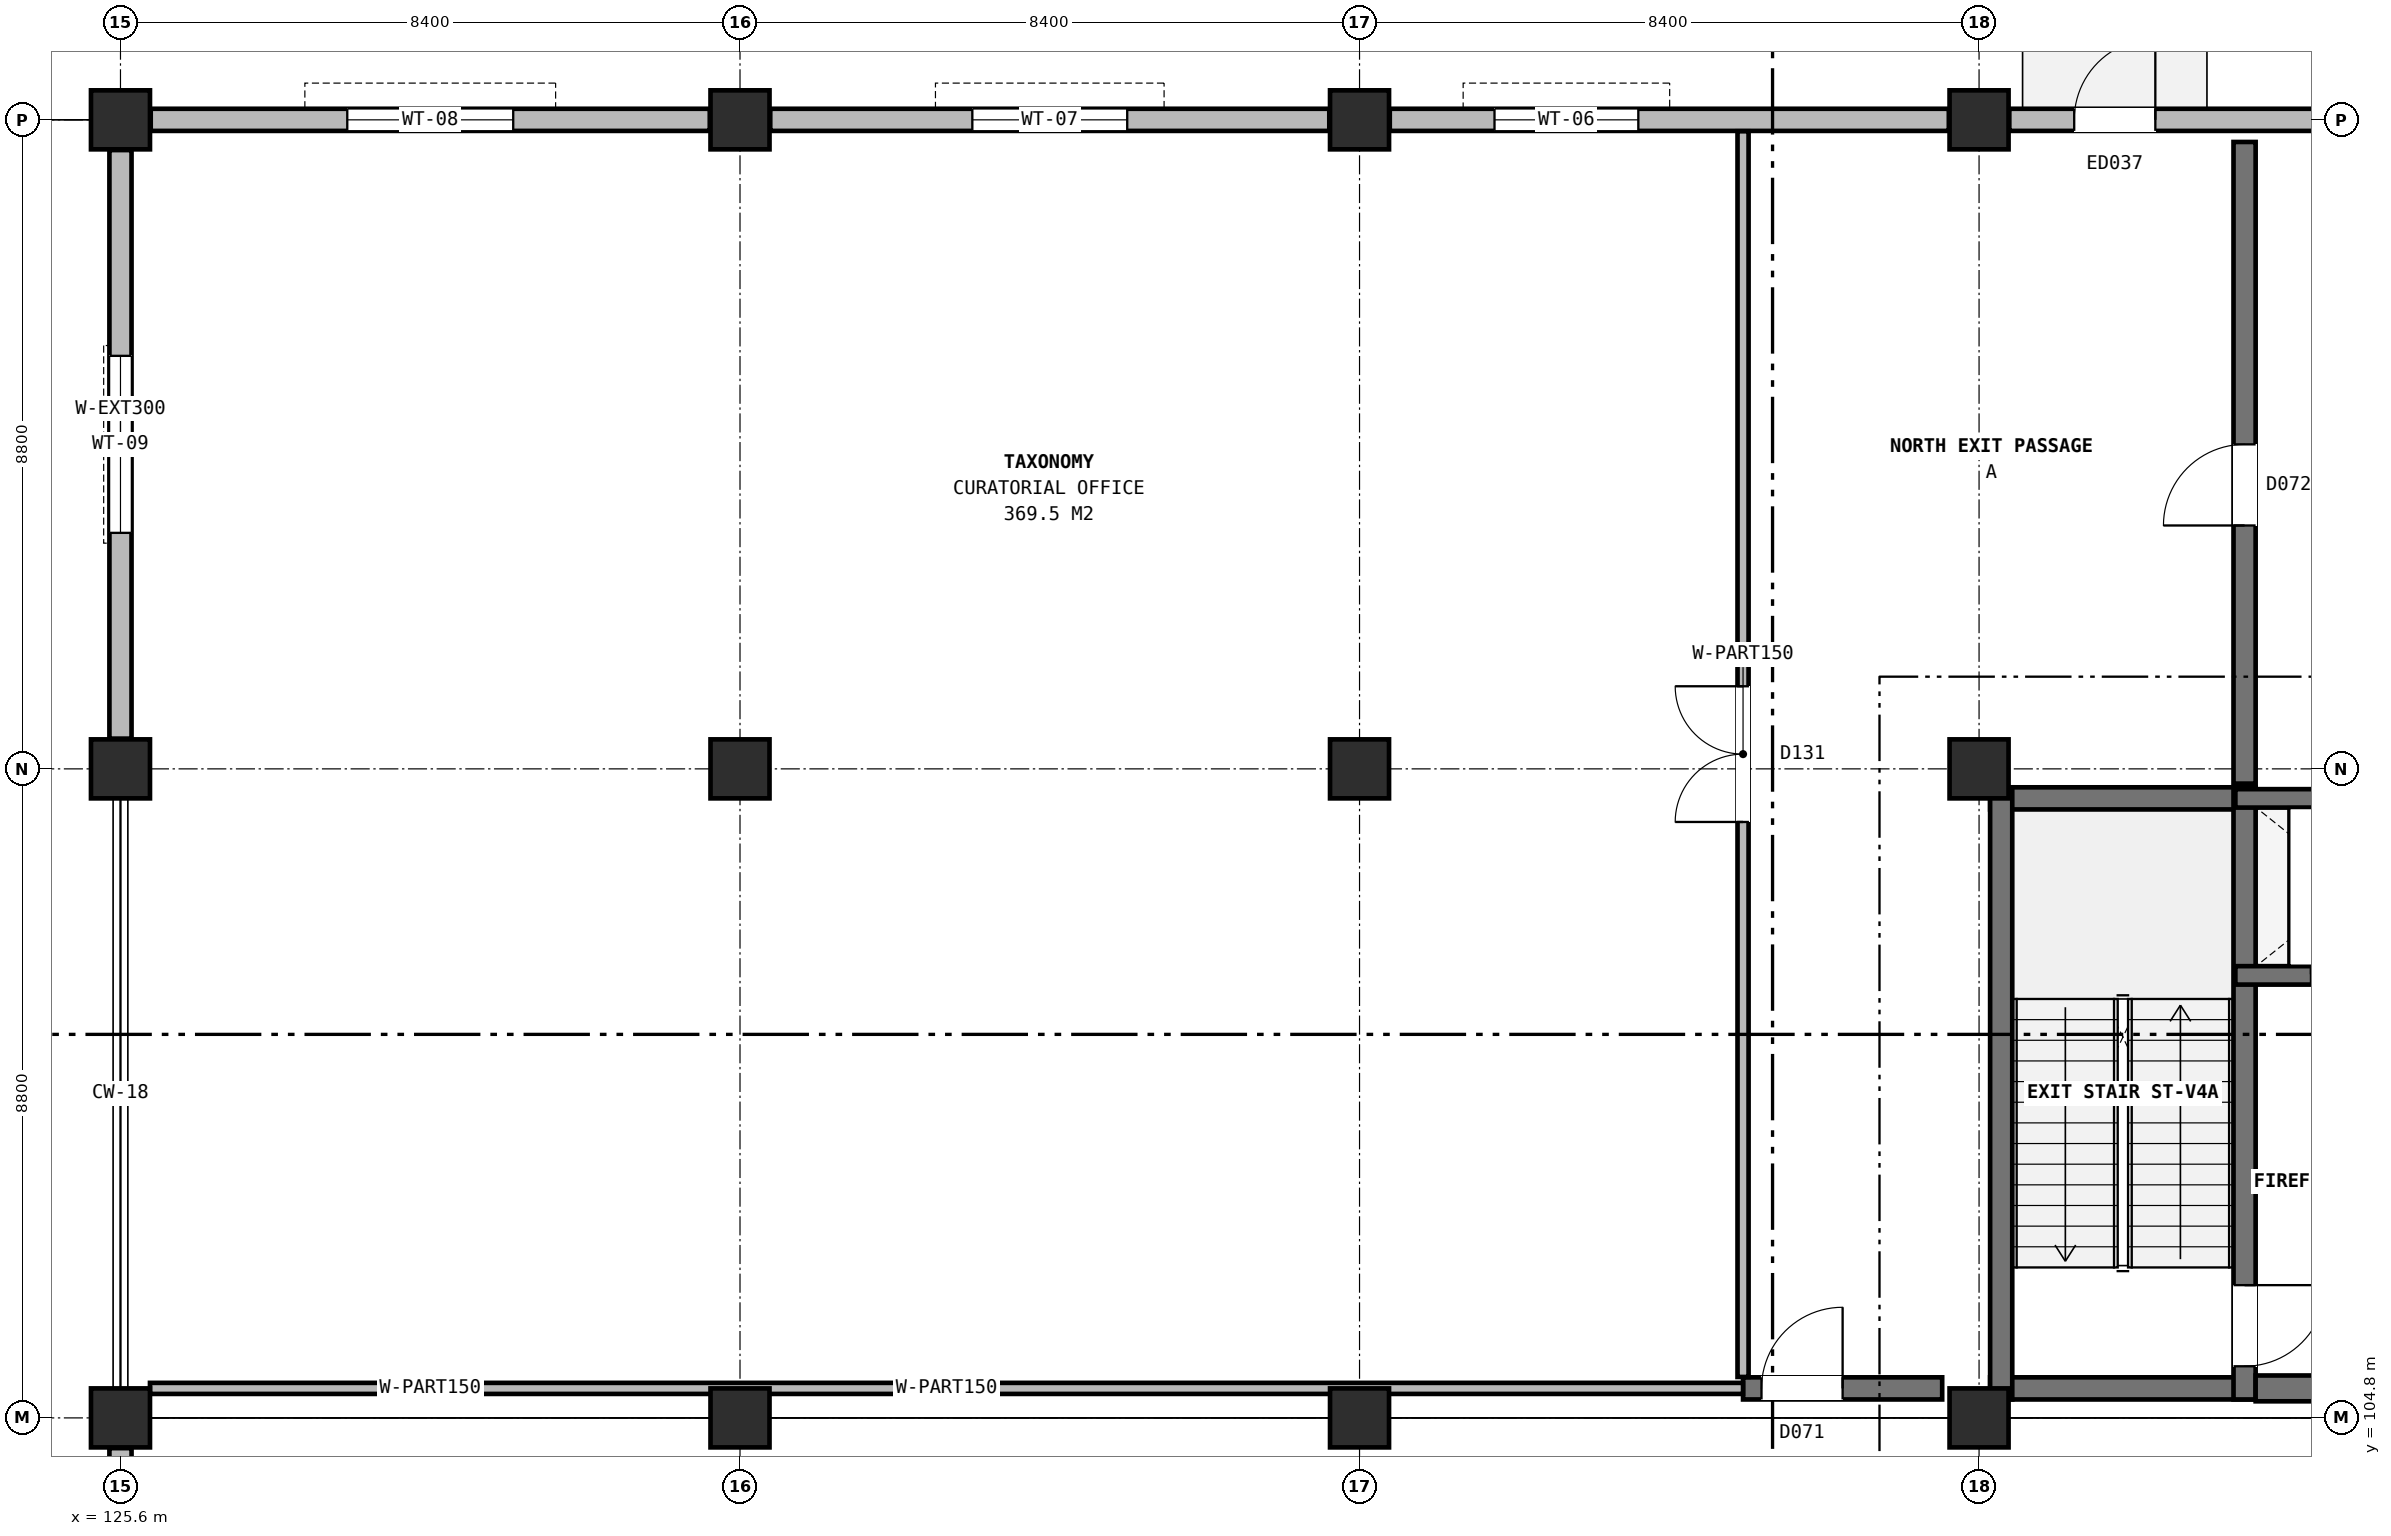
"""IFC4 building model, lengths in metres.
Left out: names, types, materials, properties, quantities, classifications, styles, units other than length and angle.
Written with IfcOpenShell. Run it as: python <this file> out.ifc"""

import sys

from ifc_helpers import new_model, si_unit, direction, frame, frame_2d, origin, origin_2d, place, context, subcontext, project, spatial, rectangle, extrude, element, fill, save


model = new_model("IFC4")
c1 = context("Model", 3, precision=1e-05, world=origin(), true_north=direction((0.0, 1.0)))
c2 = subcontext(c1, "Body", "Model", "MODEL_VIEW")
j1 = project(units=[si_unit("LENGTHUNIT", "METRE"), si_unit("PLANEANGLEUNIT", "RADIAN")], contexts=[c1])
p1 = place(None, origin())
s1 = spatial("IfcSite", under=j1, at=p1, CompositionType="ELEMENT")
p2 = place(p1, origin())
s2 = spatial("IfcBuilding", under=s1, at=p2, CompositionType="ELEMENT")
p3 = place(p2, origin())
s3 = spatial("IfcBuildingStorey", under=s2, at=p3, CompositionType="ELEMENT", Elevation=0.0)
for number, where, z_axis, x_axis in (
    (1, (125.6, 104.8, 0.0), (0.0, 0.0, 1.0), (1.0, 0.0, 0.0)),
    (2, (125.6, 113.6, 0.0), (0.0, 0.0, 1.0), (1.0, 0.0, 0.0)),
    (3, (125.6, 122.4, 0.0), (0.0, 0.0, 1.0), (1.0, 0.0, 0.0)),
    (4, (134.0, 104.8, 0.0), (0.0, 0.0, 1.0), (1.0, 0.0, 0.0)),
    (5, (134.0, 113.6, 0.0), (0.0, 0.0, 1.0), (1.0, 0.0, 0.0)),
    (6, (134.0, 122.4, 0.0), (0.0, 0.0, 1.0), (1.0, 0.0, 0.0)),
    (7, (142.4, 104.8, 0.0), (0.0, 0.0, 1.0), (1.0, 0.0, 0.0)),
    (8, (142.4, 113.6, 0.0), (0.0, 0.0, 1.0), (1.0, 0.0, 0.0)),
    (9, (142.4, 122.4, 0.0), (0.0, 0.0, 1.0), (1.0, 0.0, 0.0)),
    (10, (150.8, 104.8, 0.0), (0.0, 0.0, 1.0), (1.0, 0.0, 0.0)),
    (11, (150.8, 113.6, 0.0), (0.0, 0.0, 1.0), (1.0, 0.0, 0.0)),
    (12, (150.8, 122.4, 0.0), (0.0, 0.0, 1.0), (1.0, 0.0, 0.0)),
):
    element("IfcColumn", number, at=place(p3, frame(where, z_axis=z_axis, x_axis=x_axis)), inside=s3, PredefinedType="COLUMN", context=c2, shape_type="SweptSolid", body=[
        extrude(rectangle(XDim=0.8, YDim=0.8, at=origin_2d()), origin(), (0.0, 0.0, 1.0), 4.8),
    ])
p4 = place(p3, frame((158.79, 122.4, 0.0), z_axis=(0.0, 0.0, 1.0), x_axis=(-1.0, 0.0, 0.0)))
e13 = element("IfcWall", 13, at=p4, inside=s3, PredefinedType="SOLIDWALL", context=c2, shape_type="SweptSolid", body=[
    extrude(rectangle(XDim=7.58, YDim=0.3, at=frame_2d((3.79, 0.0))), origin(), (0.0, 0.0, 1.0), 4.05),
])
p5 = place(p4, frame((5.6, 0.0, 0.0)))
e14 = element("IfcOpeningElement", 14, at=p5, cuts=e13, PredefinedType="OPENING", context=c2, shape_type="SweptSolid", body=[
    extrude(rectangle(XDim=1.1, YDim=2.2, at=frame_2d((0.55, 1.1))), frame((0.0, 0.16, 0.0), z_axis=(0.0, -1.0, 0.0), x_axis=(1.0, 0.0, 0.0)), (0.0, 0.0, 1.0), 0.32),
])
p6 = place(p3, frame((150.39, 122.4, 0.0), z_axis=(0.0, 0.0, 1.0), x_axis=(-1.0, 0.0, 0.0)))
e15 = element("IfcWall", 15, at=p6, inside=s3, PredefinedType="SOLIDWALL", context=c2, shape_type="SweptSolid", body=[
    extrude(rectangle(XDim=7.58, YDim=0.3, at=frame_2d((3.79, 0.0))), origin(), (0.0, 0.0, 1.0), 4.05),
])
p7 = place(p6, frame((4.21, 0.0, 0.9)))
e16 = element("IfcOpeningElement", 16, at=p7, cuts=e15, PredefinedType="OPENING", context=c2, shape_type="SweptSolid", body=[
    extrude(rectangle(XDim=1.95, YDim=1.9, at=frame_2d((0.975, 0.95))), frame((0.0, 0.16, 0.0), z_axis=(0.0, -1.0, 0.0), x_axis=(1.0, 0.0, 0.0)), (0.0, 0.0, 1.0), 0.32),
])
p8 = place(p3, frame((141.99, 122.4, 0.0), z_axis=(0.0, 0.0, 1.0), x_axis=(-1.0, 0.0, 0.0)))
e17 = element("IfcWall", 17, at=p8, inside=s3, PredefinedType="SOLIDWALL", context=c2, shape_type="SweptSolid", body=[
    extrude(rectangle(XDim=7.58, YDim=0.3, at=frame_2d((3.79, 0.0))), origin(), (0.0, 0.0, 1.0), 4.05),
])
p9 = place(p8, frame((2.74, 0.0, 0.9)))
e18 = element("IfcOpeningElement", 18, at=p9, cuts=e17, PredefinedType="OPENING", context=c2, shape_type="SweptSolid", body=[
    extrude(rectangle(XDim=2.1, YDim=1.95, at=frame_2d((1.05, 0.975))), frame((0.0, 0.16, 0.0), z_axis=(0.0, -1.0, 0.0), x_axis=(1.0, 0.0, 0.0)), (0.0, 0.0, 1.0), 0.32),
])
p10 = place(p3, frame((133.59, 122.4, 0.0), z_axis=(0.0, 0.0, 1.0), x_axis=(-1.0, 0.0, 0.0)))
e19 = element("IfcWall", 19, at=p10, inside=s3, PredefinedType="SOLIDWALL", context=c2, shape_type="SweptSolid", body=[
    extrude(rectangle(XDim=7.58, YDim=0.3, at=frame_2d((3.79, 0.0))), origin(), (0.0, 0.0, 1.0), 4.05),
])
p11 = place(p10, frame((2.665, 0.0, 0.9)))
e20 = element("IfcOpeningElement", 20, at=p11, cuts=e19, PredefinedType="OPENING", context=c2, shape_type="SweptSolid", body=[
    extrude(rectangle(XDim=2.25, YDim=1.95, at=frame_2d((1.125, 0.975))), frame((0.0, 0.16, 0.0), z_axis=(0.0, -1.0, 0.0), x_axis=(1.0, 0.0, 0.0)), (0.0, 0.0, 1.0), 0.32),
])
p12 = place(p3, frame((125.6, 121.99, 0.0), z_axis=(0.0, 0.0, 1.0), x_axis=(0.0, -1.0, 0.0)))
e21 = element("IfcWall", 21, at=p12, inside=s3, PredefinedType="SOLIDWALL", context=c2, shape_type="SweptSolid", body=[
    extrude(rectangle(XDim=7.98, YDim=0.3, at=frame_2d((3.99, 0.0))), origin(), (0.0, 0.0, 1.0), 4.05),
])
p13 = place(p12, frame((2.79, 0.0, 0.9)))
e22 = element("IfcOpeningElement", 22, at=p13, cuts=e21, PredefinedType="OPENING", context=c2, shape_type="SweptSolid", body=[
    extrude(rectangle(XDim=2.4, YDim=2.0, at=frame_2d((1.2, 1.0))), frame((0.0, 0.16, 0.0), z_axis=(0.0, -1.0, 0.0), x_axis=(1.0, 0.0, 0.0)), (0.0, 0.0, 1.0), 0.32),
])
p14 = place(p3, frame((125.6, 104.39, 0.0), z_axis=(0.0, 0.0, 1.0), x_axis=(0.0, -1.0, 0.0)))
e23 = element("IfcWall", 23, at=p14, inside=s3, PredefinedType="SOLIDWALL", context=c2, shape_type="SweptSolid", body=[
    extrude(rectangle(XDim=2.38, YDim=0.3, at=frame_2d((1.19, 0.0))), origin(), (0.0, 0.0, 1.0), 4.05),
])
for number, where, z_axis, x_axis in (
    (24, (150.95, 105.2, 0.0), (0.0, 0.0, 1.0), (1.0, 0.0, 0.0)),
    (25, (150.95, 113.2, 0.0), (0.0, 0.0, 1.0), (1.0, 0.0, 0.0)),
):
    element("IfcWall", number, at=place(p3, frame(where, z_axis=z_axis, x_axis=x_axis)), inside=s3, PredefinedType="SHEAR", context=c2, shape_type="SweptSolid", body=[
        extrude(rectangle(XDim=3.6, YDim=0.3, at=frame_2d((1.8, 0.0))), origin(), (0.0, 0.0, 1.0), 4.8),
    ])
p15 = place(p3, frame((151.1, 105.05, 0.0), z_axis=(0.0, 0.0, 1.0), x_axis=(0.0, 1.0, 0.0)))
e26 = element("IfcWall", 26, at=p15, inside=s3, PredefinedType="SHEAR", context=c2, shape_type="SweptSolid", body=[
    extrude(rectangle(XDim=8.3, YDim=0.3, at=frame_2d((4.15, 0.0))), origin(), (0.0, 0.0, 1.0), 4.8),
])
p16 = place(p3, frame((154.4, 105.05, 0.0), z_axis=(0.0, 0.0, 1.0), x_axis=(0.0, 1.0, 0.0)))
e27 = element("IfcWall", 27, at=p16, inside=s3, PredefinedType="SHEAR", context=c2, shape_type="SweptSolid", body=[
    extrude(rectangle(XDim=8.3, YDim=0.3, at=frame_2d((4.15, 0.0))), origin(), (0.0, 0.0, 1.0), 4.8),
])
p17 = place(p16, frame((0.45, 0.0, 0.0)))
e28 = element("IfcOpeningElement", 28, at=p17, cuts=e27, PredefinedType="OPENING", context=c2, shape_type="SweptSolid", body=[
    extrude(rectangle(XDim=1.1, YDim=2.2, at=frame_2d((0.55, 1.1))), frame((0.0, 0.16, 0.0), z_axis=(0.0, -1.0, 0.0), x_axis=(1.0, 0.0, 0.0)), (0.0, 0.0, 1.0), 0.32),
])
p18 = place(p3, frame((154.275, 110.8, 0.0), z_axis=(0.0, 0.0, 1.0), x_axis=(1.0, 0.0, 0.0)))
e29 = element("IfcWall", 29, at=p18, inside=s3, PredefinedType="SOLIDWALL", context=c2, shape_type="SweptSolid", body=[
    extrude(rectangle(XDim=3.25, YDim=0.25, at=frame_2d((1.625, 0.0))), origin(), (0.0, 0.0, 1.0), 4.48),
])
p19 = place(p18, frame((1.025, 0.0, 0.0)))
e30 = element("IfcOpeningElement", 30, at=p19, cuts=e29, PredefinedType="OPENING", context=c2, shape_type="SweptSolid", body=[
    extrude(rectangle(XDim=1.2, YDim=2.2, at=frame_2d((0.6, 1.1))), frame((0.0, 0.135, 0.0), z_axis=(0.0, -1.0, 0.0), x_axis=(1.0, 0.0, 0.0)), (0.0, 0.0, 1.0), 0.27),
])
p20 = place(p3, frame((154.275, 113.2, 0.0), z_axis=(0.0, 0.0, 1.0), x_axis=(1.0, 0.0, 0.0)))
e31 = element("IfcWall", 31, at=p20, inside=s3, PredefinedType="SOLIDWALL", context=c2, shape_type="SweptSolid", body=[
    extrude(rectangle(XDim=3.25, YDim=0.25, at=frame_2d((1.625, 0.0))), origin(), (0.0, 0.0, 1.0), 4.48),
])
p21 = place(p3, frame((154.55, 105.2, 0.0), z_axis=(0.0, 0.0, 1.0), x_axis=(1.0, 0.0, 0.0)))
e32 = element("IfcWall", 32, at=p21, inside=s3, PredefinedType="SHEAR", context=c2, shape_type="SweptSolid", body=[
    extrude(rectangle(XDim=2.7, YDim=0.35, at=frame_2d((1.35, 0.0))), origin(), (0.0, 0.0, 1.0), 4.48),
])
p22 = place(p21, frame((0.8, 0.0, 0.0)))
e33 = element("IfcOpeningElement", 33, at=p22, cuts=e32, PredefinedType="OPENING", context=c2, shape_type="SweptSolid", body=[
    extrude(rectangle(XDim=1.1, YDim=2.2, at=frame_2d((0.55, 1.1))), frame((0.0, 0.185, 0.0), z_axis=(0.0, -1.0, 0.0), x_axis=(1.0, 0.0, 0.0)), (0.0, 0.0, 1.0), 0.37),
])
p23 = place(p3, frame((147.6, 105.2, 0.0), z_axis=(0.0, 0.0, 1.0), x_axis=(1.0, 0.0, 0.0)))
e34 = element("IfcWall", 34, at=p23, inside=s3, PredefinedType="SHEAR", context=c2, shape_type="SweptSolid", body=[
    extrude(rectangle(XDim=2.7, YDim=0.3, at=frame_2d((1.35, 0.0))), origin(), (0.0, 0.0, 1.0), 4.48),
])
p24 = place(p23, frame((0.25, 0.0, 0.0)))
e35 = element("IfcOpeningElement", 35, at=p24, cuts=e34, PredefinedType="OPENING", context=c2, shape_type="SweptSolid", body=[
    extrude(rectangle(XDim=1.1, YDim=2.2, at=frame_2d((0.55, 1.1))), frame((0.0, 0.16, 0.0), z_axis=(0.0, -1.0, 0.0), x_axis=(1.0, 0.0, 0.0)), (0.0, 0.0, 1.0), 0.32),
])
p25 = place(p3, frame((154.4, 113.4, 0.0), z_axis=(0.0, 0.0, 1.0), x_axis=(0.0, 1.0, 0.0)))
e36 = element("IfcWall", 36, at=p25, inside=s3, PredefinedType="SHEAR", context=c2, shape_type="SweptSolid", body=[
    extrude(rectangle(XDim=8.7, YDim=0.3, at=frame_2d((4.35, 0.0))), origin(), (0.0, 0.0, 1.0), 4.48),
])
p26 = place(p25, frame((3.5, 0.0, 0.0)))
e37 = element("IfcOpeningElement", 37, at=p26, cuts=e36, PredefinedType="OPENING", context=c2, shape_type="SweptSolid", body=[
    extrude(rectangle(XDim=1.1, YDim=2.2, at=frame_2d((0.55, 1.1))), frame((0.0, 0.16, 0.0), z_axis=(0.0, -1.0, 0.0), x_axis=(1.0, 0.0, 0.0)), (0.0, 0.0, 1.0), 0.32),
])
p27 = place(p3, frame((147.6, 105.355, 0.0), z_axis=(0.0, 0.0, 1.0), x_axis=(0.0, 1.0, 0.0)))
e38 = element("IfcWall", 38, at=p27, inside=s3, PredefinedType="PARTITIONING", context=c2, shape_type="SweptSolid", body=[
    extrude(rectangle(XDim=16.89, YDim=0.15, at=frame_2d((8.445, 0.0))), origin(), (0.0, 0.0, 1.0), 4.465),
])
p28 = place(p27, frame((7.525, 0.0, 0.0)))
e39 = element("IfcOpeningElement", 39, at=p28, cuts=e38, PredefinedType="OPENING", context=c2, shape_type="SweptSolid", body=[
    extrude(rectangle(XDim=1.84, YDim=2.38, at=frame_2d((0.92, 1.19))), frame((0.0, 0.085, 0.0), z_axis=(0.0, -1.0, 0.0), x_axis=(1.0, 0.0, 0.0)), (0.0, 0.0, 1.0), 0.17),
])
p29 = place(p3, frame((126.0, 105.2, 0.0), z_axis=(0.0, 0.0, 1.0), x_axis=(1.0, 0.0, 0.0)))
e40 = element("IfcWall", 40, at=p29, inside=s3, PredefinedType="PARTITIONING", context=c2, shape_type="SweptSolid", body=[
    extrude(rectangle(XDim=21.6, YDim=0.15, at=frame_2d((10.8, 0.0))), origin(), (0.0, 0.0, 1.0), 4.045),
])
p30 = place(p5, frame((1.1, 0.0, 0.0), z_axis=(0.0, 0.0, 1.0), x_axis=(-1.0, 0.0, 0.0)))
e41 = element("IfcDoor", 41, at=p30, inside=s3, OperationType="SINGLE_SWING_LEFT", PredefinedType="DOOR", context=c2, shape_type="SweptSolid", body=[
    extrude(rectangle(XDim=1.1, YDim=2.2, at=frame_2d((0.55, 1.1))), frame((0.0, 0.025, 0.0), z_axis=(0.0, -1.0, 0.0), x_axis=(1.0, 0.0, 0.0)), (0.0, 0.0, 1.0), 0.05),
])
fill(e14, e41)
p31 = place(p7, origin())
e42 = element("IfcWindow", 42, at=p31, inside=s3, PartitioningType="SINGLE_PANEL", PredefinedType="WINDOW", context=c2, shape_type="SweptSolid", body=[
    extrude(rectangle(XDim=1.95, YDim=1.9, at=frame_2d((0.975, 0.95))), frame((0.0, 0.03, 0.0), z_axis=(0.0, -1.0, 0.0), x_axis=(1.0, 0.0, 0.0)), (0.0, 0.0, 1.0), 0.06),
])
fill(e16, e42)
p32 = place(p9, origin())
e43 = element("IfcWindow", 43, at=p32, inside=s3, PartitioningType="SINGLE_PANEL", PredefinedType="WINDOW", context=c2, shape_type="SweptSolid", body=[
    extrude(rectangle(XDim=2.1, YDim=1.95, at=frame_2d((1.05, 0.975))), frame((0.0, 0.03, 0.0), z_axis=(0.0, -1.0, 0.0), x_axis=(1.0, 0.0, 0.0)), (0.0, 0.0, 1.0), 0.06),
])
fill(e18, e43)
p33 = place(p11, origin())
e44 = element("IfcWindow", 44, at=p33, inside=s3, PartitioningType="SINGLE_PANEL", PredefinedType="WINDOW", context=c2, shape_type="SweptSolid", body=[
    extrude(rectangle(XDim=2.25, YDim=1.95, at=frame_2d((1.125, 0.975))), frame((0.0, 0.03, 0.0), z_axis=(0.0, -1.0, 0.0), x_axis=(1.0, 0.0, 0.0)), (0.0, 0.0, 1.0), 0.06),
])
fill(e20, e44)
p34 = place(p13, origin())
e45 = element("IfcWindow", 45, at=p34, inside=s3, PartitioningType="SINGLE_PANEL", PredefinedType="WINDOW", context=c2, shape_type="SweptSolid", body=[
    extrude(rectangle(XDim=2.4, YDim=2.0, at=frame_2d((1.2, 1.0))), frame((0.0, 0.03, 0.0), z_axis=(0.0, -1.0, 0.0), x_axis=(1.0, 0.0, 0.0)), (0.0, 0.0, 1.0), 0.06),
])
fill(e22, e45)
p35 = place(p17, frame((1.1, 0.0, 0.0), z_axis=(0.0, 0.0, 1.0), x_axis=(-1.0, 0.0, 0.0)))
e46 = element("IfcDoor", 46, at=p35, inside=s3, OperationType="SINGLE_SWING_RIGHT", PredefinedType="DOOR", context=c2, shape_type="SweptSolid", body=[
    extrude(rectangle(XDim=1.1, YDim=2.2, at=frame_2d((0.55, 1.1))), frame((0.0, 0.025, 0.0), z_axis=(0.0, -1.0, 0.0), x_axis=(1.0, 0.0, 0.0)), (0.0, 0.0, 1.0), 0.05),
])
fill(e28, e46)
p36 = place(p19, origin())
e47 = element("IfcDoor", 47, at=p36, inside=s3, OperationType="SLIDING_TO_LEFT", PredefinedType="DOOR", context=c2, shape_type="SweptSolid", body=[
    extrude(rectangle(XDim=1.2, YDim=2.2, at=frame_2d((0.6, 1.1))), frame((0.0, 0.025, 0.0), z_axis=(0.0, -1.0, 0.0), x_axis=(1.0, 0.0, 0.0)), (0.0, 0.0, 1.0), 0.05),
])
fill(e30, e47)
p37 = place(p24, origin())
e48 = element("IfcDoor", 48, at=p37, inside=s3, OperationType="SINGLE_SWING_RIGHT", PredefinedType="DOOR", context=c2, shape_type="SweptSolid", body=[
    extrude(rectangle(XDim=1.1, YDim=2.2, at=frame_2d((0.55, 1.1))), frame((0.0, 0.025, 0.0), z_axis=(0.0, -1.0, 0.0), x_axis=(1.0, 0.0, 0.0)), (0.0, 0.0, 1.0), 0.05),
])
fill(e35, e48)
p38 = place(p26, origin())
e49 = element("IfcDoor", 49, at=p38, inside=s3, OperationType="SINGLE_SWING_LEFT", PredefinedType="DOOR", context=c2, shape_type="SweptSolid", body=[
    extrude(rectangle(XDim=1.1, YDim=2.2, at=frame_2d((0.55, 1.1))), frame((0.0, 0.025, 0.0), z_axis=(0.0, -1.0, 0.0), x_axis=(1.0, 0.0, 0.0)), (0.0, 0.0, 1.0), 0.05),
])
fill(e37, e49)
p39 = place(p28, origin())
e50 = element("IfcDoor", 50, at=p39, inside=s3, OperationType="DOUBLE_DOOR_SINGLE_SWING", PredefinedType="DOOR", context=c2, shape_type="SweptSolid", body=[
    extrude(rectangle(XDim=1.84, YDim=2.38, at=frame_2d((0.92, 1.19))), frame((0.0, 0.025, 0.0), z_axis=(0.0, -1.0, 0.0), x_axis=(1.0, 0.0, 0.0)), (0.0, 0.0, 1.0), 0.05),
])
fill(e39, e50)
save(model, sys.argv[1])
